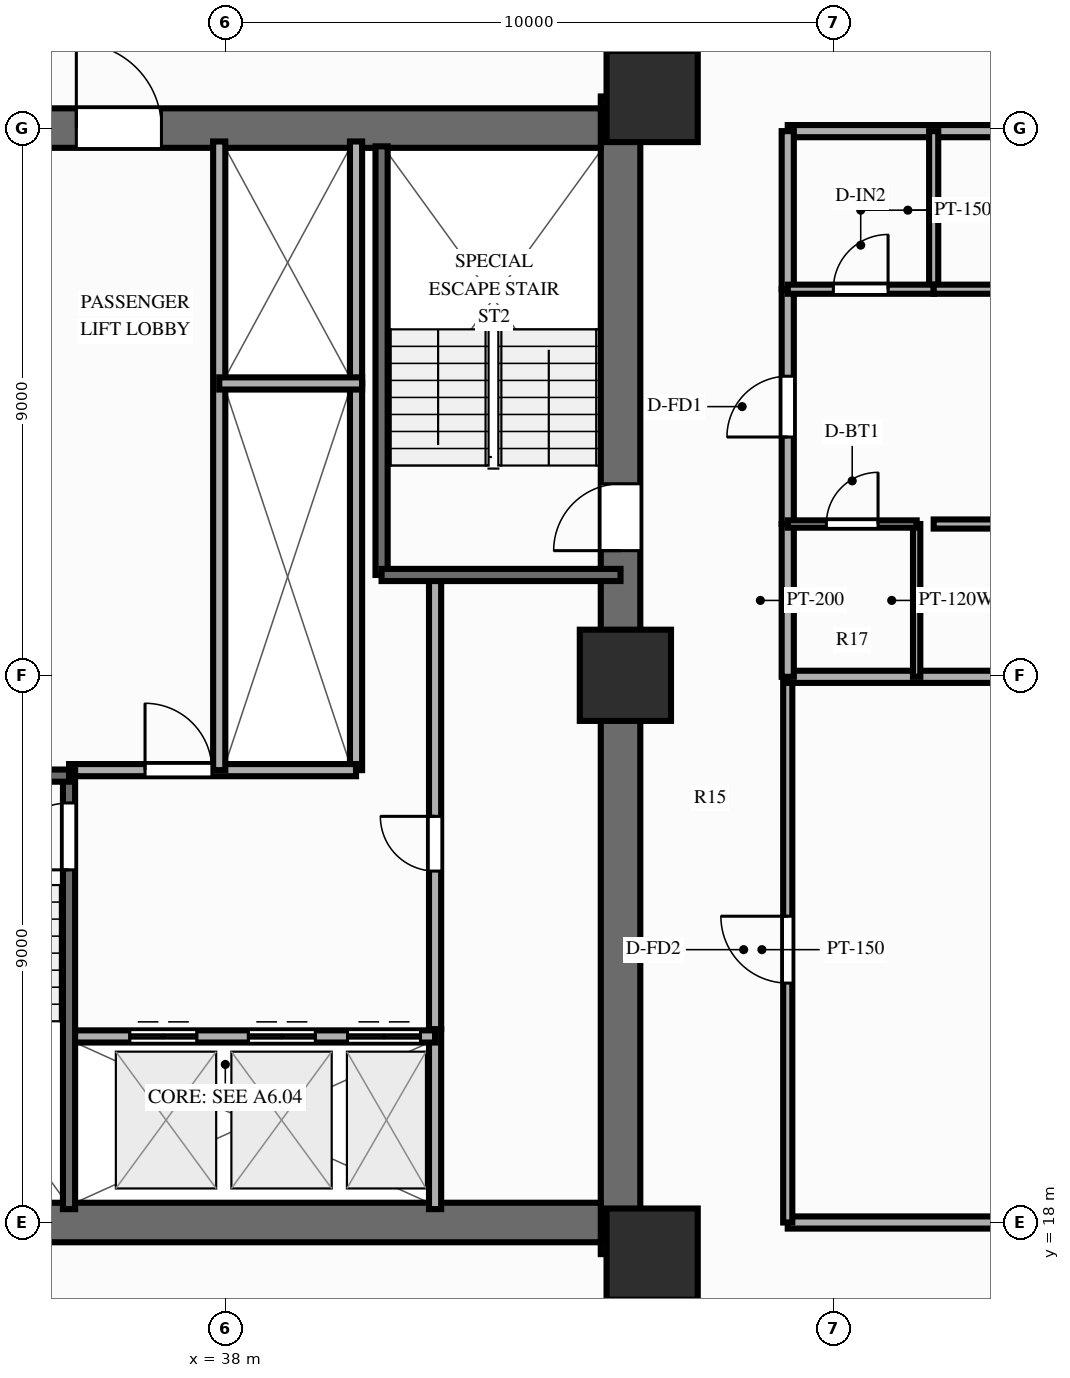
"""IFC4 building model, lengths in metres.
Left out: names, types, materials, properties, quantities, classifications, styles, units other than length and angle.
Written with IfcOpenShell. Run it as: python <this file> out.ifc"""

import sys

from ifc_helpers import new_model, si_unit, direction, frame, frame_2d, origin, origin_2d, place, context, subcontext, project, spatial, rectangle, extrude, source, transform, mapped, element, fill, save


model = new_model("IFC4")
c1 = context("Model", 3, precision=1e-05, world=origin(), true_north=direction((0.0, 1.0)))
c2 = subcontext(c1, "Body", "Model", "MODEL_VIEW")
j1 = project(units=[si_unit("LENGTHUNIT", "METRE"), si_unit("PLANEANGLEUNIT", "RADIAN")], contexts=[c1])
p1 = place(None, origin())
s1 = spatial("IfcSite", under=j1, at=p1, CompositionType="ELEMENT")
p2 = place(p1, origin())
s2 = spatial("IfcBuilding", under=s1, at=p2, CompositionType="ELEMENT")
p3 = place(p2, frame((0.0, 0.0, 46.4)))
s3 = spatial("IfcBuildingStorey", under=s2, at=p3, CompositionType="ELEMENT", Elevation=46.4)
p4 = place(p3, frame((44.5, 17.48, 0.0), z_axis=(0.0, 0.0, 1.0), x_axis=(0.0, 1.0, 0.0)))
e1 = element("IfcWall", 1, at=p4, inside=s3, PredefinedType="SHEAR", context=c2, shape_type="SweptSolid", body=[
    extrude(rectangle(XDim=19.04, YDim=0.65, at=frame_2d((9.52, 0.0))), origin(), (0.0, 0.0, 1.0), 3.0),
])
p5 = place(p4, frame((12.67, 0.0, 0.0), z_axis=(0.0, 0.0, 1.0), x_axis=(-1.0, 0.0, 0.0)))
e2 = element("IfcOpeningElement", 2, at=p5, cuts=e1, PredefinedType="OPENING", context=c2, shape_type="SweptSolid", body=[
    extrude(rectangle(XDim=1.1, YDim=2.15, at=frame_2d((0.55, 1.075))), frame((0.0, 0.337, 0.0), z_axis=(0.0, -1.0, 0.0), x_axis=(1.0, 0.0, 0.0)), (0.0, 0.0, 1.0), 0.674),
])
p6 = place(p3, frame((31.825, 18.0, 0.0), z_axis=(0.0, 0.0, 1.0), x_axis=(1.0, 0.0, 0.0)))
e3 = element("IfcWall", 3, at=p6, inside=s3, PredefinedType="SHEAR", context=c2, shape_type="SweptSolid", body=[
    extrude(rectangle(XDim=12.35, YDim=0.65, at=frame_2d((6.175, 0.0))), origin(), (0.0, 0.0, 1.0), 3.0),
])
p7 = place(p3, frame((31.825, 36.0, 0.0), z_axis=(0.0, 0.0, 1.0), x_axis=(1.0, 0.0, 0.0)))
e4 = element("IfcWall", 4, at=p7, inside=s3, PredefinedType="SHEAR", context=c2, shape_type="SweptSolid", body=[
    extrude(rectangle(XDim=12.35, YDim=0.65, at=frame_2d((6.175, 0.0))), origin(), (0.0, 0.0, 1.0), 3.0),
])
p8 = place(p7, frame((5.125, 0.0, 0.0), z_axis=(0.0, 0.0, 1.0), x_axis=(-1.0, 0.0, 0.0)))
e5 = element("IfcOpeningElement", 5, at=p8, cuts=e4, PredefinedType="OPENING", context=c2, shape_type="SweptSolid", body=[
    extrude(rectangle(XDim=1.4, YDim=2.15, at=frame_2d((0.7, 1.075))), frame((0.0, 0.337, 0.0), z_axis=(0.0, -1.0, 0.0), x_axis=(1.0, 0.0, 0.0)), (0.0, 0.0, 1.0), 0.674),
])
m1 = source(origin(), c2, "Body", "SweptSolid", [
    extrude(rectangle(XDim=1.5, YDim=1.5, at=origin_2d()), origin(), (0.0, 0.0, 1.0), 3.0),
])
for number, where, z_axis, x_axis in (
    (6, (45.02, 17.48, 0.0), (0.0, 0.0, 1.0), (1.0, 0.0, 0.0)),
    (7, (45.02, 36.52, 0.0), (0.0, 0.0, 1.0), (1.0, 0.0, 0.0)),
    (8, (44.58, 27.0, 0.0), (0.0, 0.0, 1.0), (1.0, 0.0, 0.0)),
):
    element("IfcColumn", number, at=place(p3, frame(where, z_axis=z_axis, x_axis=x_axis)), inside=s3, PredefinedType="COLUMN", context=c2, shape_type="MappedRepresentation", body=[
        mapped(m1, transform((0.0, 0.0, 0.0), scale=1.0)),
    ])
p9 = place(p3, frame((41.45, 18.22, 0.0), z_axis=(0.0, 0.0, 1.0), x_axis=(0.0, 1.0, 0.0)))
e9 = element("IfcWall", 9, at=p9, inside=s3, PredefinedType="PARTITIONING", context=c2, shape_type="SweptSolid", body=[
    extrude(rectangle(XDim=2.96, YDim=0.2, at=frame_2d((1.48, 0.0))), origin(), (0.0, 0.0, 1.0), 2.79),
])
p10 = place(p3, frame((41.45, 21.18, 0.0), z_axis=(0.0, 0.0, 1.0), x_axis=(0.0, 1.0, 0.0)))
e10 = element("IfcWall", 10, at=p10, inside=s3, PredefinedType="PARTITIONING", context=c2, shape_type="SweptSolid", body=[
    extrude(rectangle(XDim=7.42, YDim=0.2, at=frame_2d((3.71, 0.0))), origin(), (0.0, 0.0, 1.0), 2.79),
])
p11 = place(p10, frame((2.6, 0.0, 0.0)))
e11 = element("IfcOpeningElement", 11, at=p11, cuts=e10, PredefinedType="OPENING", context=c2, shape_type="SweptSolid", body=[
    extrude(rectangle(XDim=0.9, YDim=2.1, at=frame_2d((0.45, 1.05))), frame((0.0, 0.112, 0.0), z_axis=(0.0, -1.0, 0.0), x_axis=(1.0, 0.0, 0.0)), (0.0, 0.0, 1.0), 0.224),
])
p12 = place(p3, frame((40.15, 25.44, 0.0), z_axis=(0.0, 0.0, 1.0), x_axis=(0.0, 1.0, 0.0)))
e12 = element("IfcWall", 12, at=p12, inside=s3, PredefinedType="PARTITIONING", context=c2, shape_type="SweptSolid", body=[
    extrude(rectangle(XDim=6.36, YDim=0.2, at=frame_2d((3.18, 0.0))), origin(), (0.0, 0.0, 1.0), 2.79),
])
p13 = place(p3, frame((40.15, 31.8, 0.0), z_axis=(0.0, 0.0, 1.0), x_axis=(0.0, 1.0, 0.0)))
e13 = element("IfcWall", 13, at=p13, inside=s3, PredefinedType="PARTITIONING", context=c2, shape_type="SweptSolid", body=[
    extrude(rectangle(XDim=3.98, YDim=0.2, at=frame_2d((1.99, 0.0))), origin(), (0.0, 0.0, 1.0), 2.79),
])
p14 = place(p3, frame((35.43, 21.06, 0.0), z_axis=(0.0, 0.0, 1.0), x_axis=(1.0, 0.0, 0.0)))
e14 = element("IfcWall", 14, at=p14, inside=s3, PredefinedType="PARTITIONING", context=c2, shape_type="SweptSolid", body=[
    extrude(rectangle(XDim=6.02, YDim=0.2, at=frame_2d((3.01, 0.0))), origin(), (0.0, 0.0, 1.0), 2.79),
])
p15 = place(p14, frame((1.0, 0.0, 0.0)))
e15 = element("IfcOpeningElement", 15, at=p15, cuts=e14, PredefinedType="OPENING", context=c2, shape_type="SweptSolid", body=[
    extrude(rectangle(XDim=1.1, YDim=2.15, at=frame_2d((0.55, 1.075))), frame((0.0, 0.112, 0.0), z_axis=(0.0, -1.0, 0.0), x_axis=(1.0, 0.0, 0.0)), (0.0, 0.0, 1.0), 0.224),
])
p16 = place(p14, frame((2.95, 0.0, 0.0)))
e16 = element("IfcOpeningElement", 16, at=p16, cuts=e14, PredefinedType="OPENING", context=c2, shape_type="SweptSolid", body=[
    extrude(rectangle(XDim=1.1, YDim=2.15, at=frame_2d((0.55, 1.075))), frame((0.0, 0.112, 0.0), z_axis=(0.0, -1.0, 0.0), x_axis=(1.0, 0.0, 0.0)), (0.0, 0.0, 1.0), 0.224),
])
p17 = place(p14, frame((4.58, 0.0, 0.0)))
e17 = element("IfcOpeningElement", 17, at=p17, cuts=e14, PredefinedType="OPENING", context=c2, shape_type="SweptSolid", body=[
    extrude(rectangle(XDim=1.2, YDim=2.15, at=frame_2d((0.6, 1.075))), frame((0.0, 0.112, 0.0), z_axis=(0.0, -1.0, 0.0), x_axis=(1.0, 0.0, 0.0)), (0.0, 0.0, 1.0), 0.224),
])
p18 = place(p3, frame((35.43, 25.44, 0.0), z_axis=(0.0, 0.0, 1.0), x_axis=(1.0, 0.0, 0.0)))
e18 = element("IfcWall", 18, at=p18, inside=s3, PredefinedType="PARTITIONING", context=c2, shape_type="SweptSolid", body=[
    extrude(rectangle(XDim=4.72, YDim=0.2, at=frame_2d((2.36, 0.0))), origin(), (0.0, 0.0, 1.0), 2.79),
])
p19 = place(p18, frame((1.25, 0.0, 0.0)))
e19 = element("IfcOpeningElement", 19, at=p19, cuts=e18, PredefinedType="OPENING", context=c2, shape_type="SweptSolid", body=[
    extrude(rectangle(XDim=1.1, YDim=2.15, at=frame_2d((0.55, 1.075))), frame((0.0, 0.112, 0.0), z_axis=(0.0, -1.0, 0.0), x_axis=(1.0, 0.0, 0.0)), (0.0, 0.0, 1.0), 0.224),
])
p20 = place(p3, frame((35.43, 18.22, 0.0), z_axis=(0.0, 0.0, 1.0), x_axis=(0.0, 1.0, 0.0)))
e20 = element("IfcWall", 20, at=p20, inside=s3, PredefinedType="SOLIDWALL", context=c2, shape_type="SweptSolid", body=[
    extrude(rectangle(XDim=7.22, YDim=0.2, at=frame_2d((3.61, 0.0))), origin(), (0.0, 0.0, 1.0), 2.79),
])
p21 = place(p20, frame((6.68, 0.0, 0.0), z_axis=(0.0, 0.0, 1.0), x_axis=(-1.0, 0.0, 0.0)))
e21 = element("IfcOpeningElement", 21, at=p21, cuts=e20, PredefinedType="OPENING", context=c2, shape_type="SweptSolid", body=[
    extrude(rectangle(XDim=1.1, YDim=2.15, at=frame_2d((0.55, 1.075))), frame((0.0, 0.112, 0.0), z_axis=(0.0, -1.0, 0.0), x_axis=(1.0, 0.0, 0.0)), (0.0, 0.0, 1.0), 0.224),
])
p22 = place(p3, frame((31.5, 25.35, 0.0), z_axis=(0.0, 0.0, 1.0), x_axis=(1.0, 0.0, 0.0)))
e22 = element("IfcWall", 22, at=p22, inside=s3, PredefinedType="SOLIDWALL", context=c2, shape_type="SweptSolid", body=[
    extrude(rectangle(XDim=3.93, YDim=0.2, at=frame_2d((1.965, 0.0))), origin(), (0.0, 0.0, 1.0), 2.79),
])
p23 = place(p3, frame((40.57, 28.65, 0.0), z_axis=(0.0, 0.0, 1.0), x_axis=(0.0, 1.0, 0.0)))
e23 = element("IfcWall", 23, at=p23, inside=s3, PredefinedType="SOLIDWALL", context=c2, shape_type="SweptSolid", body=[
    extrude(rectangle(XDim=7.05, YDim=0.2, at=frame_2d((3.525, 0.0))), origin(), (0.0, 0.0, 1.0), 2.79),
])
p24 = place(p3, frame((40.57, 28.65, 0.0), z_axis=(0.0, 0.0, 1.0), x_axis=(1.0, 0.0, 0.0)))
e24 = element("IfcWall", 24, at=p24, inside=s3, PredefinedType="SOLIDWALL", context=c2, shape_type="SweptSolid", body=[
    extrude(rectangle(XDim=3.93, YDim=0.2, at=frame_2d((1.965, 0.0))), origin(), (0.0, 0.0, 1.0), 2.79),
])
p25 = place(p3, frame((37.9, 25.44, 0.0), z_axis=(0.0, 0.0, 1.0), x_axis=(0.0, 1.0, 0.0)))
e25 = element("IfcWall", 25, at=p25, inside=s3, PredefinedType="PARTITIONING", context=c2, shape_type="SweptSolid", body=[
    extrude(rectangle(XDim=10.34, YDim=0.2, at=frame_2d((5.17, 0.0))), origin(), (0.0, 0.0, 1.0), 2.79),
])
p26 = place(p3, frame((37.9, 31.8, 0.0), z_axis=(0.0, 0.0, 1.0), x_axis=(1.0, 0.0, 0.0)))
e26 = element("IfcWall", 26, at=p26, inside=s3, PredefinedType="PARTITIONING", context=c2, shape_type="SweptSolid", body=[
    extrude(rectangle(XDim=2.35, YDim=0.2, at=frame_2d((1.175, 0.0))), origin(), (0.0, 0.0, 1.0), 2.79),
])
for number, where, z_axis, x_axis in (
    (27, (47.25, 18.0, 0.0), (0.0, 0.0, 1.0), (1.0, 0.0, 0.0)),
    (28, (47.25, 35.95, 0.0), (0.0, 0.0, 1.0), (1.0, 0.0, 0.0)),
):
    element("IfcWall", number, at=place(p3, frame(where, z_axis=z_axis, x_axis=x_axis)), inside=s3, PredefinedType="PARTITIONING", context=c2, shape_type="SweptSolid", body=[
        extrude(rectangle(XDim=16.6, YDim=0.2, at=frame_2d((8.3, 0.0))), origin(), (0.0, 0.0, 1.0), 2.24),
    ])
p27 = place(p3, frame((47.25, 18.0, 0.0), z_axis=(0.0, 0.0, 1.0), x_axis=(0.0, 1.0, 0.0)))
e29 = element("IfcWall", 29, at=p27, inside=s3, PredefinedType="PARTITIONING", context=c2, shape_type="SweptSolid", body=[
    extrude(rectangle(XDim=8.975, YDim=0.15, at=frame_2d((4.488, 0.0))), origin(), (0.0, 0.0, 1.0), 2.79),
])
p28 = place(p27, frame((3.938, 0.0, 0.0)))
e30 = element("IfcOpeningElement", 30, at=p28, cuts=e29, PredefinedType="OPENING", context=c2, shape_type="SweptSolid", body=[
    extrude(rectangle(XDim=1.1, YDim=2.15, at=frame_2d((0.55, 1.075))), frame((0.0, 0.087, 0.0), z_axis=(0.0, -1.0, 0.0), x_axis=(1.0, 0.0, 0.0)), (0.0, 0.0, 1.0), 0.174),
])
p29 = place(p3, frame((47.25, 26.975, 0.0), z_axis=(0.0, 0.0, 1.0), x_axis=(1.0, 0.0, 0.0)))
e31 = element("IfcWall", 31, at=p29, inside=s3, PredefinedType="PARTITIONING", context=c2, shape_type="SweptSolid", body=[
    extrude(rectangle(XDim=16.6, YDim=0.2, at=frame_2d((8.3, 0.0))), origin(), (0.0, 0.0, 1.0), 2.79),
])
p30 = place(p3, frame((47.25, 26.975, 0.0), z_axis=(0.0, 0.0, 1.0), x_axis=(0.0, 1.0, 0.0)))
e32 = element("IfcWall", 32, at=p30, inside=s3, PredefinedType="PARTITIONING", context=c2, shape_type="SweptSolid", body=[
    extrude(rectangle(XDim=2.513, YDim=0.2, at=frame_2d((1.256, 0.0))), origin(), (0.0, 0.0, 1.0), 2.79),
])
p31 = place(p3, frame((47.25, 29.488, 0.0), z_axis=(0.0, 0.0, 1.0), x_axis=(0.0, 1.0, 0.0)))
e33 = element("IfcWall", 33, at=p31, inside=s3, PredefinedType="PARTITIONING", context=c2, shape_type="SweptSolid", body=[
    extrude(rectangle(XDim=3.862, YDim=0.2, at=frame_2d((1.931, 0.0))), origin(), (0.0, 0.0, 1.0), 2.79),
])
p32 = place(p31, frame((1.431, 0.0, 0.0)))
e34 = element("IfcOpeningElement", 34, at=p32, cuts=e33, PredefinedType="OPENING", context=c2, shape_type="SweptSolid", body=[
    extrude(rectangle(XDim=1.0, YDim=2.15, at=frame_2d((0.5, 1.075))), frame((0.0, 0.112, 0.0), z_axis=(0.0, -1.0, 0.0), x_axis=(1.0, 0.0, 0.0)), (0.0, 0.0, 1.0), 0.224),
])
p33 = place(p3, frame((47.25, 33.35, 0.0), z_axis=(0.0, 0.0, 1.0), x_axis=(0.0, 1.0, 0.0)))
e35 = element("IfcWall", 35, at=p33, inside=s3, PredefinedType="PARTITIONING", context=c2, shape_type="SweptSolid", body=[
    extrude(rectangle(XDim=2.6, YDim=0.2, at=frame_2d((1.3, 0.0))), origin(), (0.0, 0.0, 1.0), 2.79),
])
p34 = place(p3, frame((49.37, 26.975, 0.0), z_axis=(0.0, 0.0, 1.0), x_axis=(0.0, 1.0, 0.0)))
e36 = element("IfcWall", 36, at=p34, inside=s3, PredefinedType="PARTITIONING", context=c2, shape_type="SweptSolid", body=[
    extrude(rectangle(XDim=2.513, YDim=0.12, at=frame_2d((1.256, 0.0))), origin(), (0.0, 0.0, 1.0), 2.79),
])
p35 = place(p3, frame((49.65, 33.35, 0.0), z_axis=(0.0, 0.0, 1.0), x_axis=(0.0, 1.0, 0.0)))
e37 = element("IfcWall", 37, at=p35, inside=s3, PredefinedType="PARTITIONING", context=c2, shape_type="SweptSolid", body=[
    extrude(rectangle(XDim=2.6, YDim=0.15, at=frame_2d((1.3, 0.0))), origin(), (0.0, 0.0, 1.0), 2.79),
])
p36 = place(p3, frame((47.25, 29.488, 0.0), z_axis=(0.0, 0.0, 1.0), x_axis=(1.0, 0.0, 0.0)))
e38 = element("IfcWall", 38, at=p36, inside=s3, PredefinedType="PARTITIONING", context=c2, shape_type="SweptSolid", body=[
    extrude(rectangle(XDim=2.12, YDim=0.12, at=frame_2d((1.06, 0.0))), origin(), (0.0, 0.0, 1.0), 2.79),
])
p37 = place(p36, frame((0.635, 0.0, 0.0)))
e39 = element("IfcOpeningElement", 39, at=p37, cuts=e38, PredefinedType="OPENING", context=c2, shape_type="SweptSolid", body=[
    extrude(rectangle(XDim=0.85, YDim=2.05, at=frame_2d((0.425, 1.025))), frame((0.0, 0.072, 0.0), z_axis=(0.0, -1.0, 0.0), x_axis=(1.0, 0.0, 0.0)), (0.0, 0.0, 1.0), 0.144),
])
p38 = place(p3, frame((49.65, 29.488, 0.0), z_axis=(0.0, 0.0, 1.0), x_axis=(1.0, 0.0, 0.0)))
e40 = element("IfcWall", 40, at=p38, inside=s3, PredefinedType="PARTITIONING", context=c2, shape_type="SweptSolid", body=[
    extrude(rectangle(XDim=14.2, YDim=0.15, at=frame_2d((7.1, 0.0))), origin(), (0.0, 0.0, 1.0), 2.79),
])
p39 = place(p38, frame((6.116, 0.0, 0.0)))
e41 = element("IfcOpeningElement", 41, at=p39, cuts=e40, PredefinedType="OPENING", context=c2, shape_type="SweptSolid", body=[
    extrude(rectangle(XDim=0.9, YDim=2.1, at=frame_2d((0.45, 1.05))), frame((0.0, 0.087, 0.0), z_axis=(0.0, -1.0, 0.0), x_axis=(1.0, 0.0, 0.0)), (0.0, 0.0, 1.0), 0.174),
])
p40 = place(p3, frame((47.25, 33.35, 0.0), z_axis=(0.0, 0.0, 1.0), x_axis=(1.0, 0.0, 0.0)))
e42 = element("IfcWall", 42, at=p40, inside=s3, PredefinedType="PARTITIONING", context=c2, shape_type="SweptSolid", body=[
    extrude(rectangle(XDim=2.4, YDim=0.15, at=frame_2d((1.2, 0.0))), origin(), (0.0, 0.0, 1.0), 2.79),
])
p41 = place(p40, frame((0.75, 0.0, 0.0)))
e43 = element("IfcOpeningElement", 43, at=p41, cuts=e42, PredefinedType="OPENING", context=c2, shape_type="SweptSolid", body=[
    extrude(rectangle(XDim=0.9, YDim=2.1, at=frame_2d((0.45, 1.05))), frame((0.0, 0.087, 0.0), z_axis=(0.0, -1.0, 0.0), x_axis=(1.0, 0.0, 0.0)), (0.0, 0.0, 1.0), 0.174),
])
p42 = place(p3, frame((49.65, 33.35, 0.0), z_axis=(0.0, 0.0, 1.0), x_axis=(1.0, 0.0, 0.0)))
e44 = element("IfcWall", 44, at=p42, inside=s3, PredefinedType="PARTITIONING", context=c2, shape_type="SweptSolid", body=[
    extrude(rectangle(XDim=14.2, YDim=0.15, at=frame_2d((7.1, 0.0))), origin(), (0.0, 0.0, 1.0), 2.79),
])
p43 = place(p42, frame((6.116, 0.0, 0.0)))
e45 = element("IfcOpeningElement", 45, at=p43, cuts=e44, PredefinedType="OPENING", context=c2, shape_type="SweptSolid", body=[
    extrude(rectangle(XDim=0.9, YDim=2.1, at=frame_2d((0.45, 1.05))), frame((0.0, 0.087, 0.0), z_axis=(0.0, -1.0, 0.0), x_axis=(1.0, 0.0, 0.0)), (0.0, 0.0, 1.0), 0.174),
])
m2 = source(origin(), c2, "Body", "SweptSolid", [
    extrude(rectangle(XDim=1.1, YDim=2.15, at=frame_2d((0.55, 1.075))), frame((0.0, 0.025, 0.0), z_axis=(0.0, -1.0, 0.0), x_axis=(1.0, 0.0, 0.0)), (0.0, 0.0, 1.0), 0.05),
])
p44 = place(p5, origin())
e46 = element("IfcDoor", 46, at=p44, inside=s3, OperationType="SINGLE_SWING_RIGHT", PredefinedType="DOOR", context=c2, shape_type="MappedRepresentation", body=[
    mapped(m2, transform((0.0, 0.0, 0.0), scale=1.0)),
])
fill(e2, e46)
m3 = source(origin(), c2, "Body", "SweptSolid", [
    extrude(rectangle(XDim=1.4, YDim=2.15, at=frame_2d((0.7, 1.075))), frame((0.0, 0.025, 0.0), z_axis=(0.0, -1.0, 0.0), x_axis=(1.0, 0.0, 0.0)), (0.0, 0.0, 1.0), 0.05),
])
p45 = place(p8, origin())
e47 = element("IfcDoor", 47, at=p45, inside=s3, OperationType="SINGLE_SWING_RIGHT", PredefinedType="DOOR", context=c2, shape_type="MappedRepresentation", body=[
    mapped(m3, transform((0.0, 0.0, 0.0), scale=1.0)),
])
fill(e5, e47)
m4 = source(origin(), c2, "Body", "SweptSolid", [
    extrude(rectangle(XDim=0.9, YDim=2.1, at=frame_2d((0.45, 1.05))), frame((0.0, 0.025, 0.0), z_axis=(0.0, -1.0, 0.0), x_axis=(1.0, 0.0, 0.0)), (0.0, 0.0, 1.0), 0.05),
])
p46 = place(p11, origin())
e48 = element("IfcDoor", 48, at=p46, inside=s3, OperationType="SINGLE_SWING_RIGHT", PredefinedType="DOOR", context=c2, shape_type="MappedRepresentation", body=[
    mapped(m4, transform((0.0, 0.0, 0.0), scale=1.0)),
])
fill(e11, e48)
p47 = place(p15, origin())
e49 = element("IfcDoor", 49, at=p47, inside=s3, OperationType="DOUBLE_DOOR_SLIDING", PredefinedType="DOOR", context=c2, shape_type="MappedRepresentation", body=[
    mapped(m2, transform((0.0, 0.0, 0.0), scale=1.0)),
])
fill(e15, e49)
p48 = place(p16, origin())
e50 = element("IfcDoor", 50, at=p48, inside=s3, OperationType="DOUBLE_DOOR_SLIDING", PredefinedType="DOOR", context=c2, shape_type="MappedRepresentation", body=[
    mapped(m2, transform((0.0, 0.0, 0.0), scale=1.0)),
])
fill(e16, e50)
m5 = source(origin(), c2, "Body", "SweptSolid", [
    extrude(rectangle(XDim=1.2, YDim=2.15, at=frame_2d((0.6, 1.075))), frame((0.0, 0.025, 0.0), z_axis=(0.0, -1.0, 0.0), x_axis=(1.0, 0.0, 0.0)), (0.0, 0.0, 1.0), 0.05),
])
p49 = place(p17, origin())
e51 = element("IfcDoor", 51, at=p49, inside=s3, OperationType="DOUBLE_DOOR_SLIDING", PredefinedType="DOOR", context=c2, shape_type="MappedRepresentation", body=[
    mapped(m5, transform((0.0, 0.0, 0.0), scale=1.0)),
])
fill(e17, e51)
p50 = place(p19, origin())
e52 = element("IfcDoor", 52, at=p50, inside=s3, OperationType="SINGLE_SWING_LEFT", PredefinedType="DOOR", context=c2, shape_type="MappedRepresentation", body=[
    mapped(m2, transform((0.0, 0.0, 0.0), scale=1.0)),
])
fill(e19, e52)
p51 = place(p21, origin())
e53 = element("IfcDoor", 53, at=p51, inside=s3, OperationType="SINGLE_SWING_RIGHT", PredefinedType="DOOR", context=c2, shape_type="MappedRepresentation", body=[
    mapped(m2, transform((0.0, 0.0, 0.0), scale=1.0)),
])
fill(e21, e53)
p52 = place(p28, origin())
e54 = element("IfcDoor", 54, at=p52, inside=s3, OperationType="SINGLE_SWING_RIGHT", PredefinedType="DOOR", context=c2, shape_type="MappedRepresentation", body=[
    mapped(m2, transform((0.0, 0.0, 0.0), scale=1.0)),
])
fill(e30, e54)
m6 = source(origin(), c2, "Body", "SweptSolid", [
    extrude(rectangle(XDim=1.0, YDim=2.15, at=frame_2d((0.5, 1.075))), frame((0.0, 0.025, 0.0), z_axis=(0.0, -1.0, 0.0), x_axis=(1.0, 0.0, 0.0)), (0.0, 0.0, 1.0), 0.05),
])
p53 = place(p32, origin())
e55 = element("IfcDoor", 55, at=p53, inside=s3, OperationType="SINGLE_SWING_LEFT", PredefinedType="DOOR", context=c2, shape_type="MappedRepresentation", body=[
    mapped(m6, transform((0.0, 0.0, 0.0), scale=1.0)),
])
fill(e34, e55)
m7 = source(origin(), c2, "Body", "SweptSolid", [
    extrude(rectangle(XDim=0.85, YDim=2.05, at=frame_2d((0.425, 1.025))), frame((0.0, 0.025, 0.0), z_axis=(0.0, -1.0, 0.0), x_axis=(1.0, 0.0, 0.0)), (0.0, 0.0, 1.0), 0.05),
])
p54 = place(p37, origin())
e56 = element("IfcDoor", 56, at=p54, inside=s3, OperationType="SINGLE_SWING_RIGHT", PredefinedType="DOOR", context=c2, shape_type="MappedRepresentation", body=[
    mapped(m7, transform((0.0, 0.0, 0.0), scale=1.0)),
])
fill(e39, e56)
p55 = place(p41, origin())
e57 = element("IfcDoor", 57, at=p55, inside=s3, OperationType="SINGLE_SWING_RIGHT", PredefinedType="DOOR", context=c2, shape_type="MappedRepresentation", body=[
    mapped(m4, transform((0.0, 0.0, 0.0), scale=1.0)),
])
fill(e43, e57)
save(model, sys.argv[1])
